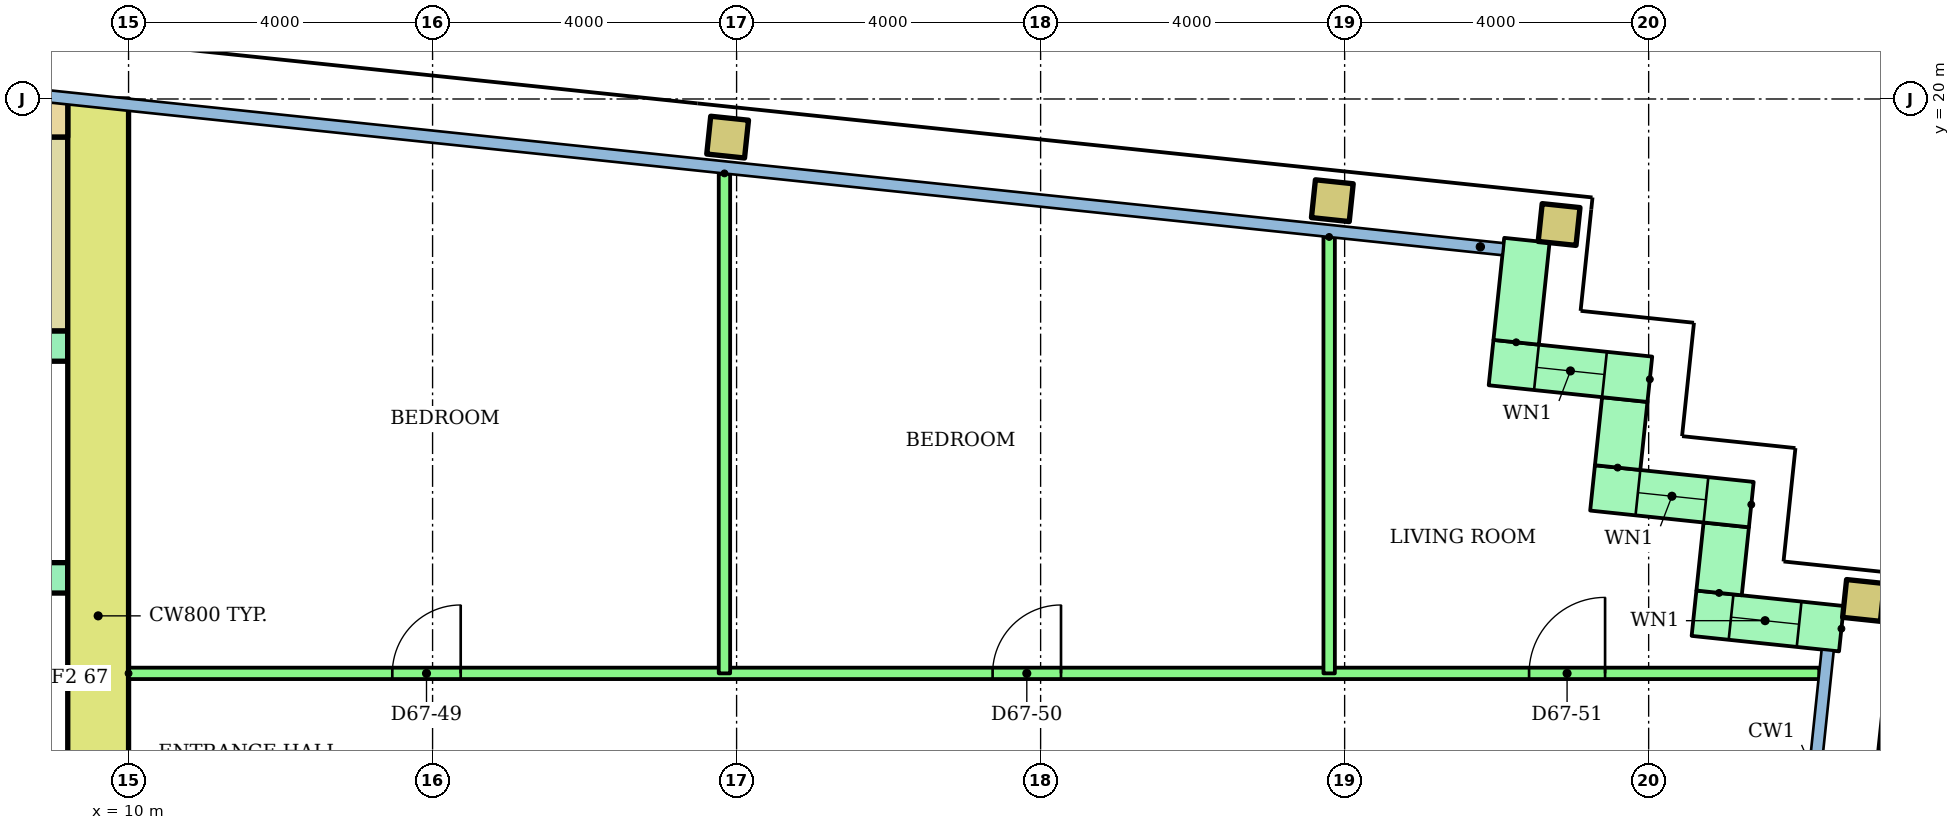
"""IFC4 building model, lengths in metres.
Left out: names, types, materials, properties, quantities, classifications, styles, units other than length and angle.
Written with IfcOpenShell. Run it as: python <this file> out.ifc"""

import sys

from ifc_helpers import new_model, si_unit, direction, frame, frame_2d, origin, origin_2d, place, context, subcontext, project, spatial, rectangle, hollow_rectangle, extrude, element, fill, save


model = new_model("IFC4")
c1 = context("Model", 3, precision=1e-05, world=origin(), true_north=direction((0.0, 1.0)))
c2 = subcontext(c1, "Body", "Model", "MODEL_VIEW")
j1 = project(units=[si_unit("LENGTHUNIT", "METRE"), si_unit("PLANEANGLEUNIT", "RADIAN")], contexts=[c1])
p1 = place(None, origin())
s1 = spatial("IfcSite", under=j1, at=p1, CompositionType="ELEMENT")
p2 = place(p1, origin())
s2 = spatial("IfcBuilding", under=s1, at=p2, CompositionType="ELEMENT")
p3 = place(p2, frame((0.0, 0.0, 259.5)))
s3 = spatial("IfcBuildingStorey", under=s2, at=p3, CompositionType="ELEMENT", Elevation=259.5)
for number, where, z_axis, x_axis in (
    (1, (32.827, 13.403, 0.0), (0.0, 0.0, 1.0), (0.995, -0.105, 0.0)),
    (2, (17.882, 19.498, 0.0), (0.0, 0.0, 1.0), (0.995, -0.105, 0.0)),
    (3, (25.838, 18.662, 0.0), (0.0, 0.0, 1.0), (0.995, -0.105, 0.0)),
    (4, (28.822, 18.349, 0.0), (0.0, 0.0, 1.0), (0.995, -0.105, 0.0)),
):
    element("IfcColumn", number, at=place(p3, frame(where, z_axis=z_axis, x_axis=x_axis)), inside=s3, PredefinedType="COLUMN", context=c2, shape_type="SweptSolid", body=[
        extrude(hollow_rectangle(XDim=0.5, YDim=0.5, WallThickness=0.025, at=origin_2d()), origin(), (0.0, 0.0, 1.0), 3.2),
    ])
p4 = place(p3, frame((32.536, 13.031, 0.0), z_axis=(0.0, 0.0, 1.0), x_axis=(-0.994534226826, 0.104411070641, 0.0)))
e5 = element("IfcWall", 5, at=p4, inside=s3, PredefinedType="STANDARD", context=c2, shape_type="SweptSolid", body=[
    extrude(rectangle(XDim=1.95, YDim=0.6, at=frame_2d((0.975, 0.0))), origin(), (0.0, 0.0, 1.0), 2.92),
])
p5 = place(p4, frame((0.56, 0.0, 0.9)))
e6 = element("IfcOpeningElement", 6, at=p5, cuts=e5, PredefinedType="OPENING", context=c2, shape_type="SweptSolid", body=[
    extrude(rectangle(XDim=0.9, YDim=1.5, at=frame_2d((0.45, 0.75))), frame((0.0, 0.31, 0.0), z_axis=(0.0, -1.0, 0.0), x_axis=(1.0, 0.0, 0.0)), (0.0, 0.0, 1.0), 0.62),
])
p6 = place(p3, frame((30.927, 13.502, 0.0), z_axis=(0.0, 0.0, 1.0), x_axis=(0.104416541099, 0.994533652495, 0.0)))
e7 = element("IfcWall", 7, at=p6, inside=s3, PredefinedType="STANDARD", context=c2, shape_type="SweptSolid", body=[
    extrude(rectangle(XDim=0.9, YDim=0.6, at=frame_2d((0.45, 0.0))), origin(), (0.0, 0.0, 1.0), 2.92),
])
p7 = place(p3, frame((31.351, 14.664, 0.0), z_axis=(0.0, 0.0, 1.0), x_axis=(-0.994523910136, 0.104509292252, 0.0)))
e8 = element("IfcWall", 8, at=p7, inside=s3, PredefinedType="STANDARD", context=c2, shape_type="SweptSolid", body=[
    extrude(rectangle(XDim=2.1, YDim=0.6, at=frame_2d((1.05, 0.0))), origin(), (0.0, 0.0, 1.0), 2.92),
])
p8 = place(p7, frame((0.6, 0.0, 0.9)))
e9 = element("IfcOpeningElement", 9, at=p8, cuts=e8, PredefinedType="OPENING", context=c2, shape_type="SweptSolid", body=[
    extrude(rectangle(XDim=0.9, YDim=1.5, at=frame_2d((0.45, 0.75))), frame((0.0, 0.31, 0.0), z_axis=(0.0, -1.0, 0.0), x_axis=(1.0, 0.0, 0.0)), (0.0, 0.0, 1.0), 0.62),
])
p9 = place(p3, frame((29.592, 15.151, 0.0), z_axis=(0.0, 0.0, 1.0), x_axis=(0.104444712852, 0.994530694326, 0.0)))
e10 = element("IfcWall", 10, at=p9, inside=s3, PredefinedType="STANDARD", context=c2, shape_type="SweptSolid", body=[
    extrude(rectangle(XDim=0.9, YDim=0.6, at=frame_2d((0.45, 0.0))), origin(), (0.0, 0.0, 1.0), 2.92),
])
p10 = place(p3, frame((30.015, 16.312, 0.0), z_axis=(0.0, 0.0, 1.0), x_axis=(-0.994510548187, 0.104636368175, 0.0)))
e11 = element("IfcWall", 11, at=p10, inside=s3, PredefinedType="STANDARD", context=c2, shape_type="SweptSolid", body=[
    extrude(rectangle(XDim=2.1, YDim=0.6, at=frame_2d((1.05, 0.0))), origin(), (0.0, 0.0, 1.0), 2.92),
])
p11 = place(p10, frame((0.6, 0.0, 0.9)))
e12 = element("IfcOpeningElement", 12, at=p11, cuts=e11, PredefinedType="OPENING", context=c2, shape_type="SweptSolid", body=[
    extrude(rectangle(XDim=0.9, YDim=1.5, at=frame_2d((0.45, 0.75))), frame((0.0, 0.31, 0.0), z_axis=(0.0, -1.0, 0.0), x_axis=(1.0, 0.0, 0.0)), (0.0, 0.0, 1.0), 0.62),
])
p12 = place(p3, frame((28.257, 16.799, 0.0), z_axis=(0.0, 0.0, 1.0), x_axis=(0.104534153452, 0.994521297289, 0.0)))
e13 = element("IfcWall", 13, at=p12, inside=s3, PredefinedType="STANDARD", context=c2, shape_type="SweptSolid", body=[
    extrude(rectangle(XDim=1.35, YDim=0.6, at=frame_2d((0.675, 0.0))), origin(), (0.0, 0.0, 1.0), 2.92),
])
p13 = place(p3, frame((9.6, 6.4, 0.0), z_axis=(0.0, 0.0, 1.0), x_axis=(0.0, 1.0, 0.0)))
e14 = element("IfcWall", 14, at=p13, inside=s3, PredefinedType="SHEAR", context=c2, shape_type="SweptSolid", body=[
    extrude(rectangle(XDim=13.6, YDim=0.8, at=frame_2d((6.8, 0.0))), origin(), (0.0, 0.0, 1.0), 2.92),
])
p14 = place(p3, frame((-9.2, 19.75, 0.0)))
e15 = element("IfcWall", 15, at=p14, inside=s3, PredefinedType="SHEAR", context=c2, shape_type="SweptSolid", body=[
    extrude(rectangle(XDim=18.4, YDim=0.5, at=frame_2d((9.2, 0.0))), origin(), (0.0, 0.0, 1.0), 2.92),
])
p15 = place(p3, frame((1.2, 13.7, 0.0)))
e16 = element("IfcWall", 16, at=p15, inside=s3, PredefinedType="SHEAR", context=c2, shape_type="SweptSolid", body=[
    extrude(rectangle(XDim=8.0, YDim=0.4, at=frame_2d((4.0, 0.0))), origin(), (0.0, 0.0, 1.0), 2.92),
])
p16 = place(p3, frame((-9.2, 16.75, 0.0)))
e17 = element("IfcWall", 17, at=p16, inside=s3, PredefinedType="SHEAR", context=c2, shape_type="SweptSolid", body=[
    extrude(rectangle(XDim=18.4, YDim=0.4, at=frame_2d((9.2, 0.0))), origin(), (0.0, 0.0, 1.0), 2.92),
])
p17 = place(p16, frame((0.1, 0.0, 0.0)))
e18 = element("IfcOpeningElement", 18, at=p17, cuts=e17, PredefinedType="OPENING", context=c2, shape_type="SweptSolid", body=[
    extrude(rectangle(XDim=0.95, YDim=2.1, at=frame_2d((0.475, 1.05))), frame((0.0, 0.21, 0.0), z_axis=(0.0, -1.0, 0.0), x_axis=(1.0, 0.0, 0.0)), (0.0, 0.0, 1.0), 0.42),
])
p18 = place(p16, frame((6.1, 0.0, 0.0)))
e19 = element("IfcOpeningElement", 19, at=p18, cuts=e17, PredefinedType="OPENING", context=c2, shape_type="SweptSolid", body=[
    extrude(rectangle(XDim=0.95, YDim=2.1, at=frame_2d((0.475, 1.05))), frame((0.0, 0.21, 0.0), z_axis=(0.0, -1.0, 0.0), x_axis=(1.0, 0.0, 0.0)), (0.0, 0.0, 1.0), 0.42),
])
p19 = place(p16, frame((12.1, 0.0, 0.0)))
e20 = element("IfcOpeningElement", 20, at=p19, cuts=e17, PredefinedType="OPENING", context=c2, shape_type="SweptSolid", body=[
    extrude(rectangle(XDim=0.95, YDim=2.1, at=frame_2d((0.475, 1.05))), frame((0.0, 0.21, 0.0), z_axis=(0.0, -1.0, 0.0), x_axis=(1.0, 0.0, 0.0)), (0.0, 0.0, 1.0), 0.42),
])
p20 = place(p3, frame((8.75, 16.95, 0.0), z_axis=(0.0, 0.0, 1.0), x_axis=(0.0, 1.0, 0.0)))
e21 = element("IfcWall", 21, at=p20, inside=s3, PredefinedType="SHEAR", context=c2, shape_type="SweptSolid", body=[
    extrude(rectangle(XDim=2.55, YDim=0.9, at=frame_2d((1.275, 0.0))), origin(), (0.0, 0.0, 1.0), 2.92),
])
p21 = place(p3, frame((10.0, 12.443, 0.0)))
e22 = element("IfcWall", 22, at=p21, inside=s3, PredefinedType="PARTITIONING", context=c2, shape_type="SweptSolid", body=[
    extrude(rectangle(XDim=22.244, YDim=0.15, at=frame_2d((11.122, 0.0))), origin(), (0.0, 0.0, 1.0), 2.4),
])
p22 = place(p21, frame((3.47, 0.0, 0.0)))
e23 = element("IfcOpeningElement", 23, at=p22, cuts=e22, PredefinedType="OPENING", context=c2, shape_type="SweptSolid", body=[
    extrude(rectangle(XDim=0.9, YDim=2.1, at=frame_2d((0.45, 1.05))), frame((0.0, 0.085, 0.0), z_axis=(0.0, -1.0, 0.0), x_axis=(1.0, 0.0, 0.0)), (0.0, 0.0, 1.0), 0.17),
])
p23 = place(p21, frame((11.368, 0.0, 0.0)))
e24 = element("IfcOpeningElement", 24, at=p23, cuts=e22, PredefinedType="OPENING", context=c2, shape_type="SweptSolid", body=[
    extrude(rectangle(XDim=0.9, YDim=2.1, at=frame_2d((0.45, 1.05))), frame((0.0, 0.085, 0.0), z_axis=(0.0, -1.0, 0.0), x_axis=(1.0, 0.0, 0.0)), (0.0, 0.0, 1.0), 0.17),
])
p24 = place(p21, frame((18.427, 0.0, 0.0)))
e25 = element("IfcOpeningElement", 25, at=p24, cuts=e22, PredefinedType="OPENING", context=c2, shape_type="SweptSolid", body=[
    extrude(rectangle(XDim=1.0, YDim=2.1, at=frame_2d((0.5, 1.05))), frame((0.0, 0.085, 0.0), z_axis=(0.0, -1.0, 0.0), x_axis=(1.0, 0.0, 0.0)), (0.0, 0.0, 1.0), 0.17),
])
p25 = place(p3, frame((17.84, 19.021, 0.0), z_axis=(0.0, 0.0, 1.0), x_axis=(0.0, -1.0, 0.0)))
e26 = element("IfcWall", 26, at=p25, inside=s3, PredefinedType="PARTITIONING", context=c2, shape_type="SweptSolid", body=[
    extrude(rectangle(XDim=6.578, YDim=0.15, at=frame_2d((3.289, 0.0))), origin(), (0.0, 0.0, 1.0), 2.4),
])
p26 = place(p3, frame((25.796, 18.185, 0.0), z_axis=(0.0, 0.0, 1.0), x_axis=(0.0, -1.0, 0.0)))
e27 = element("IfcWall", 27, at=p26, inside=s3, PredefinedType="PARTITIONING", context=c2, shape_type="SweptSolid", body=[
    extrude(rectangle(XDim=5.741, YDim=0.15, at=frame_2d((2.871, 0.0))), origin(), (0.0, 0.0, 1.0), 2.4),
])
p27 = place(p5, origin())
e28 = element("IfcWindow", 28, at=p27, inside=s3, PartitioningType="SINGLE_PANEL", PredefinedType="WINDOW", context=c2, shape_type="SweptSolid", body=[
    extrude(rectangle(XDim=0.9, YDim=1.5, at=frame_2d((0.45, 0.75))), frame((0.0, 0.03, 0.0), z_axis=(0.0, -1.0, 0.0), x_axis=(1.0, 0.0, 0.0)), (0.0, 0.0, 1.0), 0.06),
])
fill(e6, e28)
p28 = place(p8, origin())
e29 = element("IfcWindow", 29, at=p28, inside=s3, PartitioningType="SINGLE_PANEL", PredefinedType="WINDOW", context=c2, shape_type="SweptSolid", body=[
    extrude(rectangle(XDim=0.9, YDim=1.5, at=frame_2d((0.45, 0.75))), frame((0.0, 0.03, 0.0), z_axis=(0.0, -1.0, 0.0), x_axis=(1.0, 0.0, 0.0)), (0.0, 0.0, 1.0), 0.06),
])
fill(e9, e29)
p29 = place(p11, origin())
e30 = element("IfcWindow", 30, at=p29, inside=s3, PartitioningType="SINGLE_PANEL", PredefinedType="WINDOW", context=c2, shape_type="SweptSolid", body=[
    extrude(rectangle(XDim=0.9, YDim=1.5, at=frame_2d((0.45, 0.75))), frame((0.0, 0.03, 0.0), z_axis=(0.0, -1.0, 0.0), x_axis=(1.0, 0.0, 0.0)), (0.0, 0.0, 1.0), 0.06),
])
fill(e12, e30)
p30 = place(p22, origin())
e31 = element("IfcDoor", 31, at=p30, inside=s3, OperationType="SINGLE_SWING_RIGHT", PredefinedType="DOOR", context=c2, shape_type="SweptSolid", body=[
    extrude(rectangle(XDim=0.9, YDim=2.1, at=frame_2d((0.45, 1.05))), frame((0.0, 0.025, 0.0), z_axis=(0.0, -1.0, 0.0), x_axis=(1.0, 0.0, 0.0)), (0.0, 0.0, 1.0), 0.05),
])
fill(e23, e31)
p31 = place(p23, origin())
e32 = element("IfcDoor", 32, at=p31, inside=s3, OperationType="SINGLE_SWING_RIGHT", PredefinedType="DOOR", context=c2, shape_type="SweptSolid", body=[
    extrude(rectangle(XDim=0.9, YDim=2.1, at=frame_2d((0.45, 1.05))), frame((0.0, 0.025, 0.0), z_axis=(0.0, -1.0, 0.0), x_axis=(1.0, 0.0, 0.0)), (0.0, 0.0, 1.0), 0.05),
])
fill(e24, e32)
p32 = place(p24, origin())
e33 = element("IfcDoor", 33, at=p32, inside=s3, OperationType="SINGLE_SWING_RIGHT", PredefinedType="DOOR", context=c2, shape_type="SweptSolid", body=[
    extrude(rectangle(XDim=1.0, YDim=2.1, at=frame_2d((0.5, 1.05))), frame((0.0, 0.025, 0.0), z_axis=(0.0, -1.0, 0.0), x_axis=(1.0, 0.0, 0.0)), (0.0, 0.0, 1.0), 0.05),
])
fill(e25, e33)
save(model, sys.argv[1])
